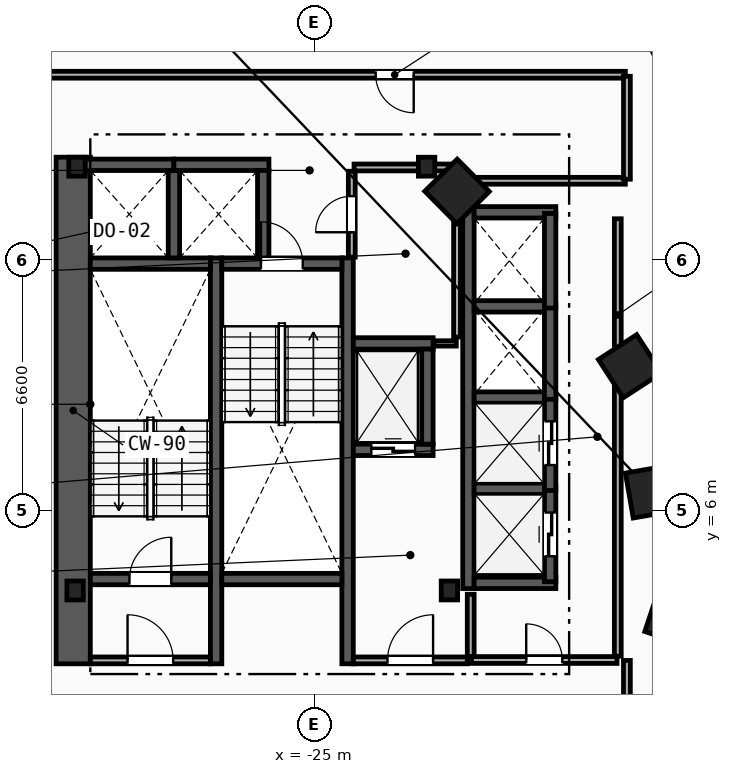
"""IFC4 building model, lengths in metres.
Left out: names, types, materials, properties, quantities, classifications, styles, units other than length and angle.
Written with IfcOpenShell. Run it as: python <this file> out.ifc"""

import sys

from ifc_helpers import new_model, si_unit, direction, frame, frame_2d, origin, origin_2d, place, context, subcontext, project, spatial, rectangle, i_section, extrude, element, fill, save


model = new_model("IFC4")
c1 = context("Model", 3, precision=1e-05, world=origin(), true_north=direction((0.0, 1.0)))
c2 = subcontext(c1, "Body", "Model", "MODEL_VIEW")
j1 = project(units=[si_unit("LENGTHUNIT", "METRE"), si_unit("PLANEANGLEUNIT", "RADIAN")], contexts=[c1])
p1 = place(None, origin())
s1 = spatial("IfcSite", under=j1, at=p1, CompositionType="ELEMENT")
p2 = place(p1, origin())
s2 = spatial("IfcBuilding", under=s1, at=p2, CompositionType="ELEMENT")
p3 = place(p2, frame((0.0, 0.0, 24.0)))
s3 = spatial("IfcBuildingStorey", under=s2, at=p3, CompositionType="ELEMENT", Elevation=24.0)
for number, where, z_axis, x_axis in (
    (1, (-31.3, 3.9, 0.0), (0.0, 0.0, 1.0), (1.0, 0.0, 0.0)),
    (2, (-21.45, 3.9, 0.0), (0.0, 0.0, 1.0), (1.0, 0.0, 0.0)),
    (3, (-22.05, 15.05, 0.0), (0.0, 0.0, 1.0), (1.0, 0.0, 0.0)),
    (4, (-31.25, 15.05, 0.0), (0.0, 0.0, 1.0), (1.0, 0.0, 0.0)),
):
    element("IfcColumn", number, at=place(p3, frame(where, z_axis=z_axis, x_axis=x_axis)), inside=s3, PredefinedType="COLUMN", context=c2, shape_type="SweptSolid", body=[
        extrude(i_section(OverallWidth=0.432, OverallDepth=0.498, WebThickness=0.056, FlangeThickness=0.089, FilletRadius=0.018, at=origin_2d()), origin(), (0.0, 0.0, 1.0), 3.8),
    ])
for number, where, z_axis, x_axis in (
    (5, (-15.55, 3.2, 0.0), (0.0, 0.0, 1.0), (0.315, 0.949, 0.0)),
    (6, (-16.125, 6.5, 0.0), (0.0, 0.0, 1.0), (-0.172, 0.985, 0.0)),
    (7, (-16.7, 9.8, 0.0), (0.0, 0.0, 1.0), (-0.544, 0.839, 0.0)),
    (8, (-21.25, 14.4, 0.0), (0.0, 0.0, 1.0), (-0.703, 0.711, 0.0)),
):
    element("IfcColumn", number, at=place(p3, frame(where, z_axis=z_axis, x_axis=x_axis)), inside=s3, PredefinedType="COLUMN", context=c2, shape_type="SweptSolid", body=[
        extrude(rectangle(XDim=1.2, YDim=1.2, at=origin_2d()), origin(), (0.0, 0.0, 1.0), 3.8),
    ])
p4 = place(p3, frame((-31.35, 1.97, 0.0), z_axis=(0.0, 0.0, 1.0), x_axis=(0.0, 1.0, 0.0)))
e9 = element("IfcWall", 9, at=p4, inside=s3, PredefinedType="SHEAR", context=c2, shape_type="SweptSolid", body=[
    extrude(rectangle(XDim=13.33, YDim=0.9, at=frame_2d((6.665, 0.0))), origin(), (0.0, 0.0, 1.0), 3.5),
])
for number, where, z_axis, x_axis in (
    (10, (-27.59, 1.97, 0.0), (0.0, 0.0, 1.0), (0.0, 1.0, 0.0)),
    (11, (-24.13, 1.97, 0.0), (0.0, 0.0, 1.0), (0.0, 1.0, 0.0)),
):
    element("IfcWall", number, at=place(p3, frame(where, z_axis=z_axis, x_axis=x_axis)), inside=s3, PredefinedType="SHEAR", context=c2, shape_type="SweptSolid", body=[
        extrude(rectangle(XDim=10.68, YDim=0.3, at=frame_2d((5.34, 0.0))), origin(), (0.0, 0.0, 1.0), 3.5),
    ])
p5 = place(p3, frame((-30.9, 4.2, 0.0), z_axis=(0.0, 0.0, 1.0), x_axis=(1.0, 0.0, 0.0)))
e12 = element("IfcWall", 12, at=p5, inside=s3, PredefinedType="SHEAR", context=c2, shape_type="SweptSolid", body=[
    extrude(rectangle(XDim=3.16, YDim=0.3, at=frame_2d((1.58, 0.0))), origin(), (0.0, 0.0, 1.0), 3.5),
])
p6 = place(p5, frame((1.03, 0.0, 0.0)))
e13 = element("IfcOpeningElement", 13, at=p6, cuts=e12, PredefinedType="OPENING", context=c2, shape_type="SweptSolid", body=[
    extrude(rectangle(XDim=1.1, YDim=2.15, at=frame_2d((0.55, 1.075))), frame((0.0, 0.16, 0.0), z_axis=(0.0, -1.0, 0.0), x_axis=(1.0, 0.0, 0.0)), (0.0, 0.0, 1.0), 0.32),
])
p7 = place(p3, frame((-30.9, 12.5, 0.0), z_axis=(0.0, 0.0, 1.0), x_axis=(1.0, 0.0, 0.0)))
e14 = element("IfcWall", 14, at=p7, inside=s3, PredefinedType="SHEAR", context=c2, shape_type="SweptSolid", body=[
    extrude(rectangle(XDim=3.16, YDim=0.3, at=frame_2d((1.58, 0.0))), origin(), (0.0, 0.0, 1.0), 3.5),
])
p8 = place(p3, frame((-27.44, 12.5, 0.0), z_axis=(0.0, 0.0, 1.0), x_axis=(1.0, 0.0, 0.0)))
e15 = element("IfcWall", 15, at=p8, inside=s3, PredefinedType="SHEAR", context=c2, shape_type="SweptSolid", body=[
    extrude(rectangle(XDim=3.16, YDim=0.3, at=frame_2d((1.58, 0.0))), origin(), (0.0, 0.0, 1.0), 3.5),
])
p9 = place(p8, frame((1.03, 0.0, 0.0)))
e16 = element("IfcOpeningElement", 16, at=p9, cuts=e15, PredefinedType="OPENING", context=c2, shape_type="SweptSolid", body=[
    extrude(rectangle(XDim=1.1, YDim=2.15, at=frame_2d((0.55, 1.075))), frame((0.0, 0.16, 0.0), z_axis=(0.0, -1.0, 0.0), x_axis=(1.0, 0.0, 0.0)), (0.0, 0.0, 1.0), 0.32),
])
p10 = place(p3, frame((-27.44, 4.2, 0.0), z_axis=(0.0, 0.0, 1.0), x_axis=(1.0, 0.0, 0.0)))
e17 = element("IfcWall", 17, at=p10, inside=s3, PredefinedType="SHEAR", context=c2, shape_type="SweptSolid", body=[
    extrude(rectangle(XDim=3.16, YDim=0.3, at=frame_2d((1.58, 0.0))), origin(), (0.0, 0.0, 1.0), 3.5),
])
p11 = place(p3, frame((-20.89, 2.15, 0.0), z_axis=(0.0, 0.0, 1.0), x_axis=(0.0, 1.0, 0.0)))
e18 = element("IfcWall", 18, at=p11, inside=s3, PredefinedType="PARTITIONING", context=c2, shape_type="SweptSolid", body=[
    extrude(rectangle(XDim=1.65, YDim=0.18, at=frame_2d((0.825, 0.0))), origin(), (0.0, 0.0, 1.0), 3.5),
])
p12 = place(p3, frame((-23.98, 2.06, 0.0), z_axis=(0.0, 0.0, 1.0), x_axis=(1.0, 0.0, 0.0)))
e19 = element("IfcWall", 19, at=p12, inside=s3, PredefinedType="PARTITIONING", context=c2, shape_type="SweptSolid", body=[
    extrude(rectangle(XDim=3.0, YDim=0.18, at=frame_2d((1.5, 0.0))), origin(), (0.0, 0.0, 1.0), 3.5),
])
p13 = place(p12, frame((0.9, 0.0, 0.0)))
e20 = element("IfcOpeningElement", 20, at=p13, cuts=e19, PredefinedType="OPENING", context=c2, shape_type="SweptSolid", body=[
    extrude(rectangle(XDim=1.2, YDim=2.15, at=frame_2d((0.6, 1.075))), frame((0.0, 0.1, 0.0), z_axis=(0.0, -1.0, 0.0), x_axis=(1.0, 0.0, 0.0)), (0.0, 0.0, 1.0), 0.2),
])
p14 = place(p3, frame((-30.9, 2.06, 0.0), z_axis=(0.0, 0.0, 1.0), x_axis=(1.0, 0.0, 0.0)))
e21 = element("IfcWall", 21, at=p14, inside=s3, PredefinedType="PARTITIONING", context=c2, shape_type="SweptSolid", body=[
    extrude(rectangle(XDim=3.16, YDim=0.18, at=frame_2d((1.58, 0.0))), origin(), (0.0, 0.0, 1.0), 3.5),
])
p15 = place(p14, frame((0.98, 0.0, 0.0)))
e22 = element("IfcOpeningElement", 22, at=p15, cuts=e21, PredefinedType="OPENING", context=c2, shape_type="SweptSolid", body=[
    extrude(rectangle(XDim=1.2, YDim=2.15, at=frame_2d((0.6, 1.075))), frame((0.0, 0.1, 0.0), z_axis=(0.0, -1.0, 0.0), x_axis=(1.0, 0.0, 0.0)), (0.0, 0.0, 1.0), 0.2),
])
p16 = place(p3, frame((-23.98, 7.6, 0.0), z_axis=(0.0, 0.0, 1.0), x_axis=(1.0, 0.0, 0.0)))
e23 = element("IfcWall", 23, at=p16, inside=s3, PredefinedType="SHEAR", context=c2, shape_type="SweptSolid", body=[
    extrude(rectangle(XDim=2.1, YDim=0.3, at=frame_2d((1.05, 0.0))), origin(), (0.0, 0.0, 1.0), 3.5),
])
p17 = place(p16, frame((0.475, 0.0, 0.0)))
e24 = element("IfcOpeningElement", 24, at=p17, cuts=e23, PredefinedType="OPENING", context=c2, shape_type="SweptSolid", body=[
    extrude(rectangle(XDim=1.15, YDim=2.2, at=frame_2d((0.575, 1.1))), frame((0.0, 0.16, 0.0), z_axis=(0.0, -1.0, 0.0), x_axis=(1.0, 0.0, 0.0)), (0.0, 0.0, 1.0), 0.32),
])
p18 = place(p3, frame((-23.98, 10.4, 0.0), z_axis=(0.0, 0.0, 1.0), x_axis=(1.0, 0.0, 0.0)))
e25 = element("IfcWall", 25, at=p18, inside=s3, PredefinedType="SHEAR", context=c2, shape_type="SweptSolid", body=[
    extrude(rectangle(XDim=2.1, YDim=0.3, at=frame_2d((1.05, 0.0))), origin(), (0.0, 0.0, 1.0), 3.5),
])
for number, where, z_axis, x_axis in (
    (26, (-22.03, 7.75, 0.0), (0.0, 0.0, 1.0), (0.0, 1.0, 0.0)),
    (27, (-31.2, 15.1, 0.0), (0.0, 0.0, 1.0), (1.0, 0.0, 0.0)),
):
    element("IfcWall", number, at=place(p3, frame(where, z_axis=z_axis, x_axis=x_axis)), inside=s3, PredefinedType="SHEAR", context=c2, shape_type="SweptSolid", body=[
        extrude(rectangle(XDim=2.5, YDim=0.3, at=frame_2d((1.25, 0.0))), origin(), (0.0, 0.0, 1.0), 3.5),
    ])
p19 = place(p3, frame((-28.7, 12.65, 0.0), z_axis=(0.0, 0.0, 1.0), x_axis=(0.0, 1.0, 0.0)))
e28 = element("IfcWall", 28, at=p19, inside=s3, PredefinedType="SHEAR", context=c2, shape_type="SweptSolid", body=[
    extrude(rectangle(XDim=2.3, YDim=0.3, at=frame_2d((1.15, 0.0))), origin(), (0.0, 0.0, 1.0), 3.5),
])
p20 = place(p3, frame((-28.7, 15.1, 0.0), z_axis=(0.0, 0.0, 1.0), x_axis=(1.0, 0.0, 0.0)))
e29 = element("IfcWall", 29, at=p20, inside=s3, PredefinedType="SHEAR", context=c2, shape_type="SweptSolid", body=[
    extrude(rectangle(XDim=2.5, YDim=0.3, at=frame_2d((1.25, 0.0))), origin(), (0.0, 0.0, 1.0), 3.5),
])
p21 = place(p3, frame((-26.35, 12.65, 0.0), z_axis=(0.0, 0.0, 1.0), x_axis=(0.0, 1.0, 0.0)))
e30 = element("IfcWall", 30, at=p21, inside=s3, PredefinedType="SHEAR", context=c2, shape_type="SweptSolid", body=[
    extrude(rectangle(XDim=2.3, YDim=0.3, at=frame_2d((1.15, 0.0))), origin(), (0.0, 0.0, 1.0), 3.5),
])
p22 = place(p3, frame((-20.95, 3.95, 0.0), z_axis=(0.0, 0.0, 1.0), x_axis=(0.0, 1.0, 0.0)))
e31 = element("IfcWall", 31, at=p22, inside=s3, PredefinedType="SHEAR", context=c2, shape_type="SweptSolid", body=[
    extrude(rectangle(XDim=10.05, YDim=0.3, at=frame_2d((5.025, 0.0))), origin(), (0.0, 0.0, 1.0), 3.5),
])
for number, where, z_axis, x_axis in (
    (32, (-20.8, 4.1, 0.0), (0.0, 0.0, 1.0), (1.0, 0.0, 0.0)),
    (33, (-20.8, 13.85, 0.0), (0.0, 0.0, 1.0), (1.0, 0.0, 0.0)),
):
    element("IfcWall", number, at=place(p3, frame(where, z_axis=z_axis, x_axis=x_axis)), inside=s3, PredefinedType="SHEAR", context=c2, shape_type="SweptSolid", body=[
        extrude(rectangle(XDim=2.15, YDim=0.3, at=frame_2d((1.075, 0.0))), origin(), (0.0, 0.0, 1.0), 3.5),
    ])
for number, where, z_axis, x_axis in (
    (34, (-20.8, 6.575, 0.0), (0.0, 0.0, 1.0), (1.0, 0.0, 0.0)),
    (35, (-20.8, 8.975, 0.0), (0.0, 0.0, 1.0), (1.0, 0.0, 0.0)),
    (36, (-20.8, 11.375, 0.0), (0.0, 0.0, 1.0), (1.0, 0.0, 0.0)),
):
    element("IfcWall", number, at=place(p3, frame(where, z_axis=z_axis, x_axis=x_axis)), inside=s3, PredefinedType="SHEAR", context=c2, shape_type="SweptSolid", body=[
        extrude(rectangle(XDim=1.85, YDim=0.3, at=frame_2d((0.925, 0.0))), origin(), (0.0, 0.0, 1.0), 3.5),
    ])
p23 = place(p3, frame((-18.8, 4.13, 0.0), z_axis=(0.0, 0.0, 1.0), x_axis=(0.0, 1.0, 0.0)))
e37 = element("IfcWall", 37, at=p23, inside=s3, PredefinedType="SHEAR", context=c2, shape_type="SweptSolid", body=[
    extrude(rectangle(XDim=2.49, YDim=0.3, at=frame_2d((1.245, 0.0))), origin(), (0.0, 0.0, 1.0), 3.5),
])
p24 = place(p23, frame((0.67, 0.0, 0.0)))
e38 = element("IfcOpeningElement", 38, at=p24, cuts=e37, PredefinedType="OPENING", context=c2, shape_type="SweptSolid", body=[
    extrude(rectangle(XDim=1.15, YDim=2.2, at=frame_2d((0.575, 1.1))), frame((0.0, 0.16, 0.0), z_axis=(0.0, -1.0, 0.0), x_axis=(1.0, 0.0, 0.0)), (0.0, 0.0, 1.0), 0.32),
])
p25 = place(p3, frame((-18.8, 6.53, 0.0), z_axis=(0.0, 0.0, 1.0), x_axis=(0.0, 1.0, 0.0)))
e39 = element("IfcWall", 39, at=p25, inside=s3, PredefinedType="SHEAR", context=c2, shape_type="SweptSolid", body=[
    extrude(rectangle(XDim=2.49, YDim=0.3, at=frame_2d((1.245, 0.0))), origin(), (0.0, 0.0, 1.0), 3.5),
])
p26 = place(p25, frame((0.67, 0.0, 0.0)))
e40 = element("IfcOpeningElement", 40, at=p26, cuts=e39, PredefinedType="OPENING", context=c2, shape_type="SweptSolid", body=[
    extrude(rectangle(XDim=1.15, YDim=2.2, at=frame_2d((0.575, 1.1))), frame((0.0, 0.16, 0.0), z_axis=(0.0, -1.0, 0.0), x_axis=(1.0, 0.0, 0.0)), (0.0, 0.0, 1.0), 0.32),
])
for number, where, z_axis, x_axis in (
    (41, (-18.8, 8.93, 0.0), (0.0, 0.0, 1.0), (0.0, 1.0, 0.0)),
    (42, (-18.8, 11.33, 0.0), (0.0, 0.0, 1.0), (0.0, 1.0, 0.0)),
):
    element("IfcWall", number, at=place(p3, frame(where, z_axis=z_axis, x_axis=x_axis)), inside=s3, PredefinedType="SHEAR", context=c2, shape_type="SweptSolid", body=[
        extrude(rectangle(XDim=2.49, YDim=0.3, at=frame_2d((1.245, 0.0))), origin(), (0.0, 0.0, 1.0), 3.5),
    ])
p27 = place(p3, frame((-17.02, 2.17, 0.0), z_axis=(0.0, 0.0, 1.0), x_axis=(0.0, 1.0, 0.0)))
e43 = element("IfcWall", 43, at=p27, inside=s3, PredefinedType="PARTITIONING", context=c2, shape_type="SweptSolid", body=[
    extrude(rectangle(XDim=11.51, YDim=0.18, at=frame_2d((5.755, 0.0))), origin(), (0.0, 0.0, 1.0), 3.5),
])
p28 = place(p3, frame((-20.87, 2.07, 0.0), z_axis=(0.0, 0.0, 1.0), x_axis=(1.0, 0.0, 0.0)))
e44 = element("IfcWall", 44, at=p28, inside=s3, PredefinedType="PARTITIONING", context=c2, shape_type="SweptSolid", body=[
    extrude(rectangle(XDim=3.83, YDim=0.18, at=frame_2d((1.915, 0.0))), origin(), (0.0, 0.0, 1.0), 3.5),
])
p29 = place(p28, frame((1.44, 0.0, 0.0)))
e45 = element("IfcOpeningElement", 45, at=p29, cuts=e44, PredefinedType="OPENING", context=c2, shape_type="SweptSolid", body=[
    extrude(rectangle(XDim=0.95, YDim=2.1, at=frame_2d((0.475, 1.05))), frame((0.0, 0.1, 0.0), z_axis=(0.0, -1.0, 0.0), x_axis=(1.0, 0.0, 0.0)), (0.0, 0.0, 1.0), 0.2),
])
p30 = place(p3, frame((-21.86, 10.4, 0.0), z_axis=(0.0, 0.0, 1.0), x_axis=(1.0, 0.0, 0.0)))
e46 = element("IfcWall", 46, at=p30, inside=s3, PredefinedType="PARTITIONING", context=c2, shape_type="SweptSolid", body=[
    extrude(rectangle(XDim=0.59, YDim=0.14, at=frame_2d((0.295, 0.0))), origin(), (0.0, 0.0, 1.0), 3.5),
])
p31 = place(p3, frame((-21.25, 10.57, 0.0), z_axis=(0.0, 0.0, 1.0), x_axis=(0.0, 1.0, 0.0)))
e47 = element("IfcWall", 47, at=p31, inside=s3, PredefinedType="PARTITIONING", context=c2, shape_type="SweptSolid", body=[
    extrude(rectangle(XDim=4.36, YDim=0.18, at=frame_2d((2.18, 0.0))), origin(), (0.0, 0.0, 1.0), 3.5),
])
p32 = place(p3, frame((-23.96, 15.03, 0.0), z_axis=(0.0, 0.0, 1.0), x_axis=(1.0, 0.0, 0.0)))
e48 = element("IfcWall", 48, at=p32, inside=s3, PredefinedType="PARTITIONING", context=c2, shape_type="SweptSolid", body=[
    extrude(rectangle(XDim=2.61, YDim=0.18, at=frame_2d((1.305, 0.0))), origin(), (0.0, 0.0, 1.0), 2.573),
])
p33 = place(p3, frame((-24.02, 12.67, 0.0), z_axis=(0.0, 0.0, 1.0), x_axis=(0.0, 1.0, 0.0)))
e49 = element("IfcWall", 49, at=p33, inside=s3, PredefinedType="PARTITIONING", context=c2, shape_type="SweptSolid", body=[
    extrude(rectangle(XDim=2.26, YDim=0.18, at=frame_2d((1.13, 0.0))), origin(), (0.0, 0.0, 1.0), 3.5),
])
p34 = place(p33, frame((0.655, 0.0, 0.0)))
e50 = element("IfcOpeningElement", 50, at=p34, cuts=e49, PredefinedType="OPENING", context=c2, shape_type="SweptSolid", body=[
    extrude(rectangle(XDim=0.95, YDim=2.1, at=frame_2d((0.475, 1.05))), frame((0.0, 0.1, 0.0), z_axis=(0.0, -1.0, 0.0), x_axis=(1.0, 0.0, 0.0)), (0.0, 0.0, 1.0), 0.2),
])
p35 = place(p3, frame((-16.822, 17.47, 0.0), z_axis=(0.0, 0.0, 1.0), x_axis=(-1.0, 0.0, 0.0)))
e51 = element("IfcWall", 51, at=p35, inside=s3, PredefinedType="PARTITIONING", context=c2, shape_type="SweptSolid", body=[
    extrude(rectangle(XDim=16.807, YDim=0.18, at=frame_2d((8.403, 0.0))), origin(), (0.0, 0.0, 1.0), 3.5),
])
p36 = place(p35, frame((5.569, 0.0, 0.0)))
e52 = element("IfcOpeningElement", 52, at=p36, cuts=e51, PredefinedType="OPENING", context=c2, shape_type="SweptSolid", body=[
    extrude(rectangle(XDim=1.0, YDim=2.15, at=frame_2d((0.5, 1.075))), frame((0.0, 0.1, 0.0), z_axis=(0.0, -1.0, 0.0), x_axis=(1.0, 0.0, 0.0)), (0.0, 0.0, 1.0), 0.2),
])
p37 = place(p3, frame((-21.178, 14.68, 0.0), z_axis=(0.0, 0.0, 1.0), x_axis=(1.0, 0.0, 0.0)))
e53 = element("IfcWall", 53, at=p37, inside=s3, PredefinedType="PARTITIONING", context=c2, shape_type="SweptSolid", body=[
    extrude(rectangle(XDim=4.357, YDim=0.18, at=frame_2d((2.178, 0.0))), origin(), (0.0, 0.0, 1.0), 3.5),
])
p38 = place(p3, frame((-16.78, 14.721, 0.0), z_axis=(0.0, 0.0, 1.0), x_axis=(0.0, 1.0, 0.0)))
e54 = element("IfcWall", 54, at=p38, inside=s3, PredefinedType="PARTITIONING", context=c2, shape_type="SweptSolid", body=[
    extrude(rectangle(XDim=2.707, YDim=0.18, at=frame_2d((1.354, 0.0))), origin(), (0.0, 0.0, 1.0), 3.5),
])
p39 = place(p3, frame((-16.78, -0.329, 0.0), z_axis=(0.0, 0.0, 1.0), x_axis=(0.0, 1.0, 0.0)))
e55 = element("IfcWall", 55, at=p39, inside=s3, PredefinedType="PARTITIONING", context=c2, shape_type="SweptSolid", body=[
    extrude(rectangle(XDim=2.387, YDim=0.18, at=frame_2d((1.194, 0.0))), origin(), (0.0, 0.0, 1.0), 3.5),
])
p40 = place(p6, origin())
e56 = element("IfcDoor", 56, at=p40, inside=s3, OperationType="SINGLE_SWING_RIGHT", PredefinedType="DOOR", context=c2, shape_type="SweptSolid", body=[
    extrude(rectangle(XDim=1.1, YDim=2.15, at=frame_2d((0.55, 1.075))), frame((0.0, 0.025, 0.0), z_axis=(0.0, -1.0, 0.0), x_axis=(1.0, 0.0, 0.0)), (0.0, 0.0, 1.0), 0.05),
])
fill(e13, e56)
p41 = place(p9, origin())
e57 = element("IfcDoor", 57, at=p41, inside=s3, OperationType="SINGLE_SWING_LEFT", PredefinedType="DOOR", context=c2, shape_type="SweptSolid", body=[
    extrude(rectangle(XDim=1.1, YDim=2.15, at=frame_2d((0.55, 1.075))), frame((0.0, 0.025, 0.0), z_axis=(0.0, -1.0, 0.0), x_axis=(1.0, 0.0, 0.0)), (0.0, 0.0, 1.0), 0.05),
])
fill(e16, e57)
p42 = place(p13, origin())
e58 = element("IfcDoor", 58, at=p42, inside=s3, OperationType="SINGLE_SWING_RIGHT", PredefinedType="DOOR", context=c2, shape_type="SweptSolid", body=[
    extrude(rectangle(XDim=1.2, YDim=2.15, at=frame_2d((0.6, 1.075))), frame((0.0, 0.025, 0.0), z_axis=(0.0, -1.0, 0.0), x_axis=(1.0, 0.0, 0.0)), (0.0, 0.0, 1.0), 0.05),
])
fill(e20, e58)
p43 = place(p15, origin())
e59 = element("IfcDoor", 59, at=p43, inside=s3, OperationType="SINGLE_SWING_LEFT", PredefinedType="DOOR", context=c2, shape_type="SweptSolid", body=[
    extrude(rectangle(XDim=1.2, YDim=2.15, at=frame_2d((0.6, 1.075))), frame((0.0, 0.025, 0.0), z_axis=(0.0, -1.0, 0.0), x_axis=(1.0, 0.0, 0.0)), (0.0, 0.0, 1.0), 0.05),
])
fill(e22, e59)
p44 = place(p17, origin())
e60 = element("IfcDoor", 60, at=p44, inside=s3, OperationType="SLIDING_TO_LEFT", PredefinedType="TRAPDOOR", context=c2, shape_type="SweptSolid", body=[
    extrude(rectangle(XDim=1.15, YDim=2.2, at=frame_2d((0.575, 1.1))), frame((0.0, 0.025, 0.0), z_axis=(0.0, -1.0, 0.0), x_axis=(1.0, 0.0, 0.0)), (0.0, 0.0, 1.0), 0.05),
])
fill(e24, e60)
p45 = place(p24, origin())
e61 = element("IfcDoor", 61, at=p45, inside=s3, OperationType="SLIDING_TO_LEFT", PredefinedType="TRAPDOOR", context=c2, shape_type="SweptSolid", body=[
    extrude(rectangle(XDim=1.15, YDim=2.2, at=frame_2d((0.575, 1.1))), frame((0.0, 0.025, 0.0), z_axis=(0.0, -1.0, 0.0), x_axis=(1.0, 0.0, 0.0)), (0.0, 0.0, 1.0), 0.05),
])
fill(e38, e61)
p46 = place(p26, origin())
e62 = element("IfcDoor", 62, at=p46, inside=s3, OperationType="SLIDING_TO_LEFT", PredefinedType="TRAPDOOR", context=c2, shape_type="SweptSolid", body=[
    extrude(rectangle(XDim=1.15, YDim=2.2, at=frame_2d((0.575, 1.1))), frame((0.0, 0.025, 0.0), z_axis=(0.0, -1.0, 0.0), x_axis=(1.0, 0.0, 0.0)), (0.0, 0.0, 1.0), 0.05),
])
fill(e40, e62)
p47 = place(p36, origin())
e63 = element("IfcDoor", 63, at=p47, inside=s3, OperationType="SINGLE_SWING_LEFT", PredefinedType="DOOR", context=c2, shape_type="SweptSolid", body=[
    extrude(rectangle(XDim=1.0, YDim=2.15, at=frame_2d((0.5, 1.075))), frame((0.0, 0.025, 0.0), z_axis=(0.0, -1.0, 0.0), x_axis=(1.0, 0.0, 0.0)), (0.0, 0.0, 1.0), 0.05),
])
fill(e52, e63)
p48 = place(p29, origin())
e64 = element("IfcDoor", 64, at=p48, inside=s3, OperationType="SINGLE_SWING_LEFT", PredefinedType="DOOR", context=c2, shape_type="SweptSolid", body=[
    extrude(rectangle(XDim=0.95, YDim=2.1, at=frame_2d((0.475, 1.05))), frame((0.0, 0.025, 0.0), z_axis=(0.0, -1.0, 0.0), x_axis=(1.0, 0.0, 0.0)), (0.0, 0.0, 1.0), 0.05),
])
fill(e45, e64)
p49 = place(p34, origin())
e65 = element("IfcDoor", 65, at=p49, inside=s3, OperationType="SINGLE_SWING_LEFT", PredefinedType="DOOR", context=c2, shape_type="SweptSolid", body=[
    extrude(rectangle(XDim=0.95, YDim=2.1, at=frame_2d((0.475, 1.05))), frame((0.0, 0.025, 0.0), z_axis=(0.0, -1.0, 0.0), x_axis=(1.0, 0.0, 0.0)), (0.0, 0.0, 1.0), 0.05),
])
fill(e50, e65)
save(model, sys.argv[1])
